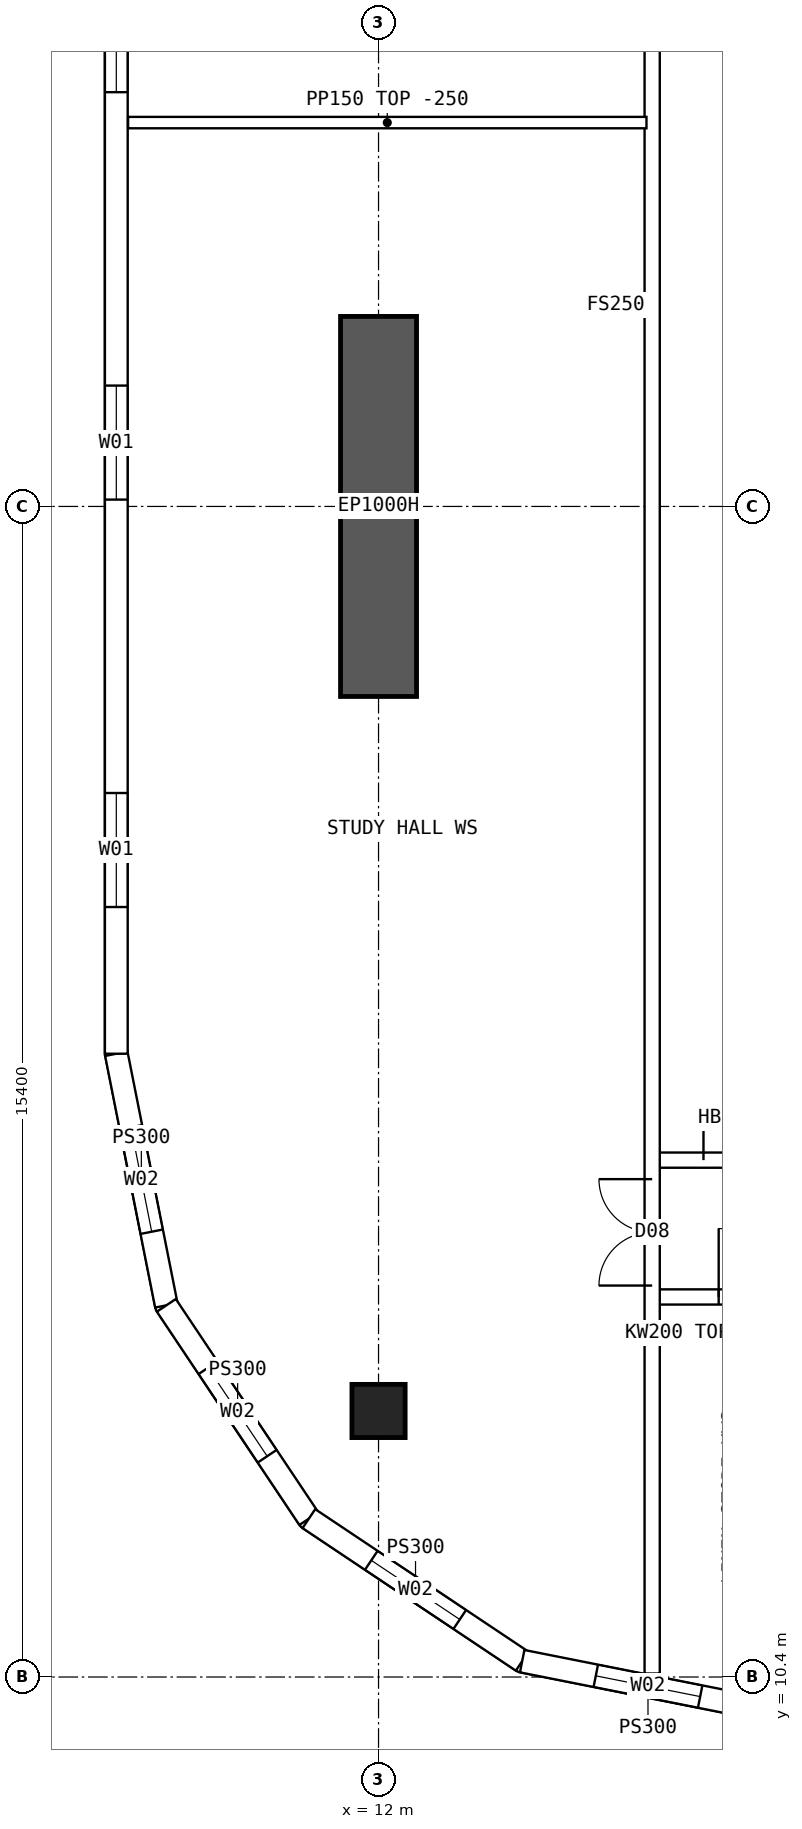
"""IFC4 building model, lengths in metres.
Left out: names, types, materials, properties, quantities, classifications, styles, units other than length and angle.
Written with IfcOpenShell. Run it as: python <this file> out.ifc"""

import sys

from ifc_helpers import new_model, si_unit, direction, frame, frame_2d, origin, origin_2d, place, context, subcontext, project, spatial, polyline, rectangle, hollow_rectangle, outline, extrude, element, fill, save


model = new_model("IFC4")
c1 = context("Model", 3, precision=1e-05, world=origin(), true_north=direction((0.0, 1.0)))
c2 = subcontext(c1, "Body", "Model", "MODEL_VIEW")
j1 = project(units=[si_unit("LENGTHUNIT", "METRE"), si_unit("PLANEANGLEUNIT", "RADIAN")], contexts=[c1])
p1 = place(None, origin())
s1 = spatial("IfcSite", under=j1, at=p1, CompositionType="ELEMENT")
p2 = place(p1, origin())
s2 = spatial("IfcBuilding", under=s1, at=p2, CompositionType="ELEMENT")
p3 = place(p2, frame((0.0, 0.0, 186.1)))
s3 = spatial("IfcBuildingStorey", under=s2, at=p3, CompositionType="ELEMENT", Elevation=186.1)
p4 = place(p3, frame((12.0, 13.9, 0.0), z_axis=(0.0, 0.0, 1.0), x_axis=(1.0, 0.0, 0.0)))
e1 = element("IfcColumn", 1, at=p4, inside=s3, PredefinedType="COLUMN", context=c2, shape_type="SweptSolid", body=[
    extrude(hollow_rectangle(XDim=0.7, YDim=0.7, WallThickness=0.07, at=origin_2d()), origin(), (0.0, 0.0, 1.0), 3.75),
])
p5 = place(p3, frame((12.0, 23.3, 0.0), z_axis=(0.0, 0.0, 1.0), x_axis=(0.0, 1.0, 0.0)))
e2 = element("IfcWall", 2, at=p5, inside=s3, PredefinedType="SHEAR", context=c2, shape_type="SweptSolid", body=[
    extrude(rectangle(XDim=5.0, YDim=1.0, at=frame_2d((2.5, 0.0))), origin(), (0.0, 0.0, 1.0), 3.75),
])
p6 = place(p3, frame((8.55, 45.4, 0.0), z_axis=(0.0, 0.0, 1.0), x_axis=(0.0, -1.0, 0.0)))
e3 = element("IfcWall", 3, at=p6, inside=s3, PredefinedType="SOLIDWALL", context=c2, shape_type="SweptSolid", body=[
    extrude(outline(polyline([(-0.015, -0.15), (26.815, -0.15), (26.785, 0.15), (0.015, 0.15), (-0.015, -0.15)])), origin(), (0.0, 0.0, 1.0), 3.5),
])
p7 = place(p6, frame((1.93, 0.0, 0.9)))
e4 = element("IfcOpeningElement", 4, at=p7, cuts=e3, PredefinedType="OPENING", context=c2, shape_type="SweptSolid", body=[
    extrude(rectangle(XDim=1.5, YDim=2.0, at=frame_2d((0.75, 1.0))), frame((0.0, 0.16, 0.0), z_axis=(0.0, -1.0, 0.0), x_axis=(1.0, 0.0, 0.0)), (0.0, 0.0, 1.0), 0.32),
])
p8 = place(p6, frame((7.29, 0.0, 0.9)))
e5 = element("IfcOpeningElement", 5, at=p8, cuts=e3, PredefinedType="OPENING", context=c2, shape_type="SweptSolid", body=[
    extrude(rectangle(XDim=1.5, YDim=2.0, at=frame_2d((0.75, 1.0))), frame((0.0, 0.16, 0.0), z_axis=(0.0, -1.0, 0.0), x_axis=(1.0, 0.0, 0.0)), (0.0, 0.0, 1.0), 0.32),
])
p9 = place(p6, frame((12.65, 0.0, 0.9)))
e6 = element("IfcOpeningElement", 6, at=p9, cuts=e3, PredefinedType="OPENING", context=c2, shape_type="SweptSolid", body=[
    extrude(rectangle(XDim=1.5, YDim=2.0, at=frame_2d((0.75, 1.0))), frame((0.0, 0.16, 0.0), z_axis=(0.0, -1.0, 0.0), x_axis=(1.0, 0.0, 0.0)), (0.0, 0.0, 1.0), 0.32),
])
p10 = place(p6, frame((18.01, 0.0, 0.9)))
e7 = element("IfcOpeningElement", 7, at=p10, cuts=e3, PredefinedType="OPENING", context=c2, shape_type="SweptSolid", body=[
    extrude(rectangle(XDim=1.5, YDim=2.0, at=frame_2d((0.75, 1.0))), frame((0.0, 0.16, 0.0), z_axis=(0.0, -1.0, 0.0), x_axis=(1.0, 0.0, 0.0)), (0.0, 0.0, 1.0), 0.32),
])
p11 = place(p6, frame((23.37, 0.0, 0.9)))
e8 = element("IfcOpeningElement", 8, at=p11, cuts=e3, PredefinedType="OPENING", context=c2, shape_type="SweptSolid", body=[
    extrude(rectangle(XDim=1.5, YDim=2.0, at=frame_2d((0.75, 1.0))), frame((0.0, 0.16, 0.0), z_axis=(0.0, -1.0, 0.0), x_axis=(1.0, 0.0, 0.0)), (0.0, 0.0, 1.0), 0.32),
])
p12 = place(p3, frame((8.55, 18.6, 0.0), z_axis=(0.0, 0.0, 1.0), x_axis=(0.19508664885, -0.980786011034, 0.0)))
e9 = element("IfcWall", 9, at=p12, inside=s3, PredefinedType="SOLIDWALL", context=c2, shape_type="SweptSolid", body=[
    extrude(outline(polyline([(-0.015, -0.15), (3.405, -0.15), (3.345, 0.15), (0.015, 0.15), (-0.015, -0.15)])), origin(), (0.0, 0.0, 1.0), 3.5),
])
p13 = place(p12, frame((0.988, 0.0, 0.9)))
e10 = element("IfcOpeningElement", 10, at=p13, cuts=e9, PredefinedType="OPENING", context=c2, shape_type="SweptSolid", body=[
    extrude(rectangle(XDim=1.4, YDim=1.8, at=frame_2d((0.7, 0.9))), frame((0.0, 0.16, 0.0), z_axis=(0.0, -1.0, 0.0), x_axis=(1.0, 0.0, 0.0)), (0.0, 0.0, 1.0), 0.32),
])
p14 = place(p3, frame((9.208, 15.29, 0.0), z_axis=(0.0, 0.0, 1.0), x_axis=(0.555534554399, -0.831493450887, 0.0)))
e11 = element("IfcWall", 11, at=p14, inside=s3, PredefinedType="SOLIDWALL", context=c2, shape_type="SweptSolid", body=[
    extrude(outline(polyline([(-0.03, -0.15), (3.405, -0.15), (3.345, 0.15), (0.03, 0.15), (-0.03, -0.15)])), origin(), (0.0, 0.0, 1.0), 3.5),
])
p15 = place(p14, frame((0.988, 0.0, 0.9)))
e12 = element("IfcOpeningElement", 12, at=p15, cuts=e11, PredefinedType="OPENING", context=c2, shape_type="SweptSolid", body=[
    extrude(rectangle(XDim=1.4, YDim=1.8, at=frame_2d((0.7, 0.9))), frame((0.0, 0.16, 0.0), z_axis=(0.0, -1.0, 0.0), x_axis=(1.0, 0.0, 0.0)), (0.0, 0.0, 1.0), 0.32),
])
p16 = place(p3, frame((11.083, 12.483, 0.0), z_axis=(0.0, 0.0, 1.0), x_axis=(0.831493450887, -0.555534554399, 0.0)))
e13 = element("IfcWall", 13, at=p16, inside=s3, PredefinedType="SOLIDWALL", context=c2, shape_type="SweptSolid", body=[
    extrude(outline(polyline([(-0.03, -0.15), (3.405, -0.15), (3.345, 0.15), (0.03, 0.15), (-0.03, -0.15)])), origin(), (0.0, 0.0, 1.0), 3.5),
])
p17 = place(p16, frame((0.988, 0.0, 0.9)))
e14 = element("IfcOpeningElement", 14, at=p17, cuts=e13, PredefinedType="OPENING", context=c2, shape_type="SweptSolid", body=[
    extrude(rectangle(XDim=1.4, YDim=1.8, at=frame_2d((0.7, 0.9))), frame((0.0, 0.16, 0.0), z_axis=(0.0, -1.0, 0.0), x_axis=(1.0, 0.0, 0.0)), (0.0, 0.0, 1.0), 0.32),
])
p18 = place(p3, frame((13.89, 10.608, 0.0), z_axis=(0.0, 0.0, 1.0), x_axis=(0.98078325777, -0.195100490205, 0.0)))
e15 = element("IfcWall", 15, at=p18, inside=s3, PredefinedType="SOLIDWALL", context=c2, shape_type="SweptSolid", body=[
    extrude(outline(polyline([(-0.03, -0.15), (3.405, -0.15), (3.345, 0.15), (0.03, 0.15), (-0.03, -0.15)])), origin(), (0.0, 0.0, 1.0), 3.5),
])
p19 = place(p18, frame((0.988, 0.0, 0.9)))
e16 = element("IfcOpeningElement", 16, at=p19, cuts=e15, PredefinedType="OPENING", context=c2, shape_type="SweptSolid", body=[
    extrude(rectangle(XDim=1.4, YDim=1.8, at=frame_2d((0.7, 0.9))), frame((0.0, 0.16, 0.0), z_axis=(0.0, -1.0, 0.0), x_axis=(1.0, 0.0, 0.0)), (0.0, 0.0, 1.0), 0.32),
])
p20 = place(p3, frame((15.6, 15.4, 0.0), z_axis=(0.0, 0.0, 1.0), x_axis=(1.0, 0.0, 0.0)))
e17 = element("IfcWall", 17, at=p20, inside=s3, PredefinedType="SOLIDWALL", context=c2, shape_type="SweptSolid", body=[
    extrude(rectangle(XDim=1.975, YDim=0.2, at=frame_2d((0.987, 0.0))), origin(), (0.0, 0.0, 1.0), 3.5),
])
p21 = place(p20, frame((0.875, 0.0, 0.0)))
e18 = element("IfcOpeningElement", 18, at=p21, cuts=e17, PredefinedType="OPENING", context=c2, shape_type="SweptSolid", body=[
    extrude(rectangle(XDim=0.9, YDim=2.1, at=frame_2d((0.45, 1.05))), frame((0.0, 0.11, 0.0), z_axis=(0.0, -1.0, 0.0), x_axis=(1.0, 0.0, 0.0)), (0.0, 0.0, 1.0), 0.22),
])
p22 = place(p3, frame((15.6, 17.2, 0.0), z_axis=(0.0, 0.0, 1.0), x_axis=(1.0, 0.0, 0.0)))
e19 = element("IfcWall", 19, at=p22, inside=s3, PredefinedType="SOLIDWALL", context=c2, shape_type="SweptSolid", body=[
    extrude(rectangle(XDim=1.975, YDim=0.2, at=frame_2d((0.987, 0.0))), origin(), (0.0, 0.0, 1.0), 3.5),
])
p23 = place(p22, frame((0.675, 0.0, 0.0)))
e20 = element("IfcOpeningElement", 20, at=p23, cuts=e19, PredefinedType="OPENING", context=c2, shape_type="SweptSolid", body=[
    extrude(rectangle(XDim=1.2, YDim=2.1, at=frame_2d((0.6, 1.05))), frame((0.0, 0.11, 0.0), z_axis=(0.0, -1.0, 0.0), x_axis=(1.0, 0.0, 0.0)), (0.0, 0.0, 1.0), 0.22),
])
p24 = place(p3, frame((8.705, 30.85, 0.0), z_axis=(0.0, 0.0, 1.0), x_axis=(1.0, 0.0, 0.0)))
e21 = element("IfcWall", 21, at=p24, inside=s3, PredefinedType="PARTITIONING", context=c2, shape_type="SweptSolid", body=[
    extrude(outline(polyline([(0.0, 0.0), (6.82, 0.0), (6.82, 3.5), (3.597, 3.5), (3.595, 3.05), (2.997, 3.05), (2.995, 3.5), (0.0, 3.5), (0.0, 0.0)])), frame((0.0, 0.075, 0.0), z_axis=(0.0, -1.0, 0.0), x_axis=(1.0, 0.0, 0.0)), (0.0, 0.0, 1.0), 0.15),
])
p25 = place(p3, frame((15.6, 10.446, 0.0), z_axis=(0.0, 0.0, 1.0), x_axis=(0.0, 1.0, 0.0)))
e22 = element("IfcWall", 22, at=p25, inside=s3, PredefinedType="SOLIDWALL", context=c2, shape_type="SweptSolid", body=[
    extrude(rectangle(XDim=43.107, YDim=0.2, at=frame_2d((21.554, 0.0))), origin(), (0.0, 0.0, 1.0), 3.5),
])
p26 = place(p25, frame((22.634, 0.0, 0.0)))
e23 = element("IfcOpeningElement", 23, at=p26, cuts=e22, PredefinedType="OPENING", context=c2, shape_type="SweptSolid", body=[
    extrude(rectangle(XDim=1.2, YDim=2.1, at=frame_2d((0.6, 1.05))), frame((0.0, 0.11, 0.0), z_axis=(0.0, -1.0, 0.0), x_axis=(1.0, 0.0, 0.0)), (0.0, 0.0, 1.0), 0.22),
])
p27 = place(p25, frame((5.104, 0.0, 0.0)))
e24 = element("IfcOpeningElement", 24, at=p27, cuts=e22, PredefinedType="OPENING", context=c2, shape_type="SweptSolid", body=[
    extrude(rectangle(XDim=1.4, YDim=2.1, at=frame_2d((0.7, 1.05))), frame((0.0, 0.11, 0.0), z_axis=(0.0, -1.0, 0.0), x_axis=(1.0, 0.0, 0.0)), (0.0, 0.0, 1.0), 0.22),
])
p28 = place(p25, frame((36.504, 0.0, 0.0)))
e25 = element("IfcOpeningElement", 25, at=p28, cuts=e22, PredefinedType="OPENING", context=c2, shape_type="SweptSolid", body=[
    extrude(rectangle(XDim=1.4, YDim=2.1, at=frame_2d((0.7, 1.05))), frame((0.0, 0.11, 0.0), z_axis=(0.0, -1.0, 0.0), x_axis=(1.0, 0.0, 0.0)), (0.0, 0.0, 1.0), 0.22),
])
p29 = place(p9, origin())
e26 = element("IfcWindow", 26, at=p29, inside=s3, PartitioningType="SINGLE_PANEL", PredefinedType="WINDOW", context=c2, shape_type="SweptSolid", body=[
    extrude(rectangle(XDim=1.5, YDim=2.0, at=frame_2d((0.75, 1.0))), frame((0.0, 0.03, 0.0), z_axis=(0.0, -1.0, 0.0), x_axis=(1.0, 0.0, 0.0)), (0.0, 0.0, 1.0), 0.06),
])
fill(e6, e26)
p30 = place(p10, origin())
e27 = element("IfcWindow", 27, at=p30, inside=s3, PartitioningType="SINGLE_PANEL", PredefinedType="WINDOW", context=c2, shape_type="SweptSolid", body=[
    extrude(rectangle(XDim=1.5, YDim=2.0, at=frame_2d((0.75, 1.0))), frame((0.0, 0.03, 0.0), z_axis=(0.0, -1.0, 0.0), x_axis=(1.0, 0.0, 0.0)), (0.0, 0.0, 1.0), 0.06),
])
fill(e7, e27)
p31 = place(p11, origin())
e28 = element("IfcWindow", 28, at=p31, inside=s3, PartitioningType="SINGLE_PANEL", PredefinedType="WINDOW", context=c2, shape_type="SweptSolid", body=[
    extrude(rectangle(XDim=1.5, YDim=2.0, at=frame_2d((0.75, 1.0))), frame((0.0, 0.03, 0.0), z_axis=(0.0, -1.0, 0.0), x_axis=(1.0, 0.0, 0.0)), (0.0, 0.0, 1.0), 0.06),
])
fill(e8, e28)
p32 = place(p13, origin())
e29 = element("IfcWindow", 29, at=p32, inside=s3, PartitioningType="SINGLE_PANEL", PredefinedType="WINDOW", context=c2, shape_type="SweptSolid", body=[
    extrude(rectangle(XDim=1.4, YDim=1.8, at=frame_2d((0.7, 0.9))), frame((0.0, 0.03, 0.0), z_axis=(0.0, -1.0, 0.0), x_axis=(1.0, 0.0, 0.0)), (0.0, 0.0, 1.0), 0.06),
])
fill(e10, e29)
p33 = place(p15, origin())
e30 = element("IfcWindow", 30, at=p33, inside=s3, PartitioningType="SINGLE_PANEL", PredefinedType="WINDOW", context=c2, shape_type="SweptSolid", body=[
    extrude(rectangle(XDim=1.4, YDim=1.8, at=frame_2d((0.7, 0.9))), frame((0.0, 0.03, 0.0), z_axis=(0.0, -1.0, 0.0), x_axis=(1.0, 0.0, 0.0)), (0.0, 0.0, 1.0), 0.06),
])
fill(e12, e30)
p34 = place(p17, origin())
e31 = element("IfcWindow", 31, at=p34, inside=s3, PartitioningType="SINGLE_PANEL", PredefinedType="WINDOW", context=c2, shape_type="SweptSolid", body=[
    extrude(rectangle(XDim=1.4, YDim=1.8, at=frame_2d((0.7, 0.9))), frame((0.0, 0.03, 0.0), z_axis=(0.0, -1.0, 0.0), x_axis=(1.0, 0.0, 0.0)), (0.0, 0.0, 1.0), 0.06),
])
fill(e14, e31)
p35 = place(p19, origin())
e32 = element("IfcWindow", 32, at=p35, inside=s3, PartitioningType="SINGLE_PANEL", PredefinedType="WINDOW", context=c2, shape_type="SweptSolid", body=[
    extrude(rectangle(XDim=1.4, YDim=1.8, at=frame_2d((0.7, 0.9))), frame((0.0, 0.03, 0.0), z_axis=(0.0, -1.0, 0.0), x_axis=(1.0, 0.0, 0.0)), (0.0, 0.0, 1.0), 0.06),
])
fill(e16, e32)
p36 = place(p23, origin())
e33 = element("IfcDoor", 33, at=p36, inside=s3, OperationType="DOUBLE_DOOR_SINGLE_SWING", PredefinedType="DOOR", context=c2, shape_type="SweptSolid", body=[
    extrude(rectangle(XDim=1.2, YDim=2.1, at=frame_2d((0.6, 1.05))), frame((0.0, 0.025, 0.0), z_axis=(0.0, -1.0, 0.0), x_axis=(1.0, 0.0, 0.0)), (0.0, 0.0, 1.0), 0.05),
])
fill(e20, e33)
p37 = place(p27, origin())
e34 = element("IfcDoor", 34, at=p37, inside=s3, OperationType="DOUBLE_DOOR_SINGLE_SWING", PredefinedType="DOOR", context=c2, shape_type="SweptSolid", body=[
    extrude(rectangle(XDim=1.4, YDim=2.1, at=frame_2d((0.7, 1.05))), frame((0.0, 0.025, 0.0), z_axis=(0.0, -1.0, 0.0), x_axis=(1.0, 0.0, 0.0)), (0.0, 0.0, 1.0), 0.05),
])
fill(e24, e34)
p38 = place(p21, origin())
e35 = element("IfcDoor", 35, at=p38, inside=s3, OperationType="SINGLE_SWING_LEFT", PredefinedType="DOOR", context=c2, shape_type="SweptSolid", body=[
    extrude(rectangle(XDim=0.9, YDim=2.1, at=frame_2d((0.45, 1.05))), frame((0.0, 0.025, 0.0), z_axis=(0.0, -1.0, 0.0), x_axis=(1.0, 0.0, 0.0)), (0.0, 0.0, 1.0), 0.05),
])
fill(e18, e35)
save(model, sys.argv[1])
